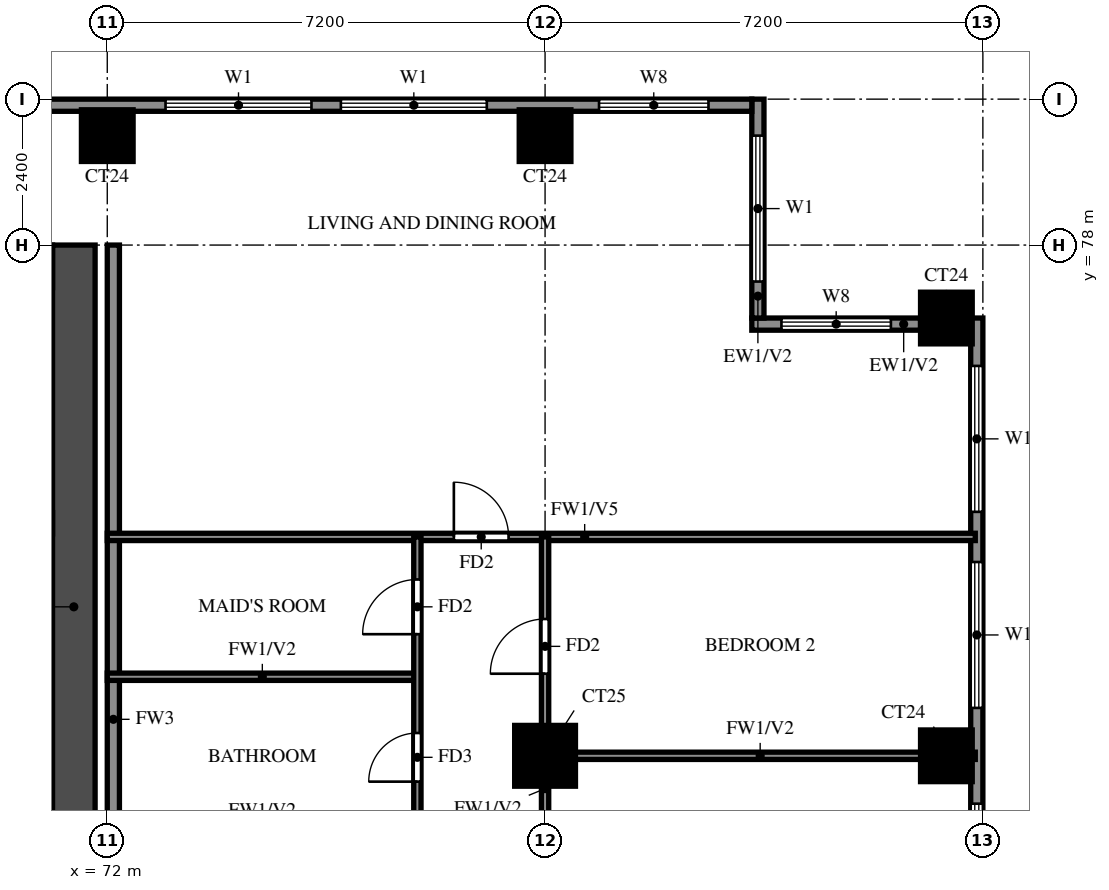
"""IFC4 building model, lengths in metres.
Left out: names, types, materials, properties, quantities, classifications, styles, units other than length and angle.
Written with IfcOpenShell. Run it as: python <this file> out.ifc"""

import sys

from ifc_helpers import new_model, si_unit, direction, frame, frame_2d, origin, origin_2d, place, context, subcontext, project, spatial, rectangle, extrude, source, transform, mapped, element, fill, save


model = new_model("IFC4")
c1 = context("Model", 3, precision=1e-05, world=origin(), true_north=direction((0.0, 1.0)))
c2 = subcontext(c1, "Body", "Model", "MODEL_VIEW")
j1 = project(units=[si_unit("LENGTHUNIT", "METRE"), si_unit("PLANEANGLEUNIT", "RADIAN")], contexts=[c1])
p1 = place(None, origin())
s1 = spatial("IfcSite", under=j1, at=p1, CompositionType="ELEMENT")
p2 = place(p1, origin())
s2 = spatial("IfcBuilding", under=s1, at=p2, CompositionType="ELEMENT")
p3 = place(p2, frame((0.0, 0.0, 146.5)))
s3 = spatial("IfcBuildingStorey", under=s2, at=p3, CompositionType="ELEMENT", Elevation=146.5)
m1 = source(origin(), c2, "Body", "SweptSolid", [
    extrude(rectangle(XDim=1.0, YDim=1.0, at=origin_2d()), origin(), (0.0, 0.0, 1.0), 3.2),
])
p4 = place(p3, frame((79.2, 69.6, 0.0), z_axis=(0.0, 0.0, 1.0), x_axis=(1.0, 0.0, 0.0)))
e1 = element("IfcColumn", 1, at=p4, inside=s3, PredefinedType="COLUMN", context=c2, shape_type="MappedRepresentation", body=[
    mapped(m1, transform((0.0, 0.0, 0.0))),
])
m2 = source(origin(), c2, "Body", "SweptSolid", [
    extrude(rectangle(XDim=0.85, YDim=0.85, at=origin_2d()), origin(), (0.0, 0.0, 1.0), 3.2),
])
for number, where, z_axis, x_axis in (
    (2, (85.8, 69.6, 0.0), (0.0, 0.0, 1.0), (1.0, 0.0, 0.0)),
    (3, (85.8, 76.8, 0.0), (0.0, 0.0, 1.0), (1.0, 0.0, 0.0)),
    (4, (72.0, 79.8, 0.0), (0.0, 0.0, 1.0), (1.0, 0.0, 0.0)),
    (5, (79.2, 79.8, 0.0), (0.0, 0.0, 1.0), (1.0, 0.0, 0.0)),
):
    element("IfcColumn", number, at=place(p3, frame(where, z_axis=z_axis, x_axis=x_axis)), inside=s3, PredefinedType="COLUMN", context=c2, shape_type="MappedRepresentation", body=[
        mapped(m2, transform((0.0, 0.0, 0.0))),
    ])
p5 = place(p3, frame((71.45, 66.1, 0.0), z_axis=(0.0, 0.0, 1.0), x_axis=(0.0, 1.0, 0.0)))
e6 = element("IfcWall", 6, at=p5, inside=s3, PredefinedType="SHEAR", context=c2, shape_type="SweptSolid", body=[
    extrude(rectangle(XDim=11.9, YDim=0.7, at=frame_2d((5.95, 0.0))), origin(), (0.0, 0.0, 1.0), 3.2),
])
p6 = place(p3, frame((29.7, 77.65, 0.0), z_axis=(0.0, 0.0, 1.0), x_axis=(1.0, 0.0, 0.0)))
e7 = element("IfcWall", 7, at=p6, inside=s3, PredefinedType="SHEAR", context=c2, shape_type="SweptSolid", body=[
    extrude(rectangle(XDim=41.4, YDim=0.7, at=frame_2d((20.7, 0.0))), origin(), (0.0, 0.0, 1.0), 3.2),
])
p7 = place(p3, frame((86.3, 62.4, 0.0), z_axis=(0.0, 0.0, 1.0), x_axis=(0.0, 1.0, 0.0)))
e8 = element("IfcWall", 8, at=p7, inside=s3, PredefinedType="SOLIDWALL", context=c2, shape_type="SweptSolid", body=[
    extrude(rectangle(XDim=14.4, YDim=0.2, at=frame_2d((7.2, 0.0))), origin(), (0.0, 0.0, 1.0), 3.2),
])
p8 = place(p7, frame((1.538, 0.0, 1.5)))
e9 = element("IfcOpeningElement", 9, at=p8, cuts=e8, PredefinedType="OPENING", context=c2, shape_type="SweptSolid", body=[
    extrude(rectangle(XDim=0.9, YDim=0.9, at=frame_2d((0.45, 0.45))), frame((0.0, 0.11, 0.0), z_axis=(0.0, -1.0, 0.0), x_axis=(1.0, 0.0, 0.0)), (0.0, 0.0, 1.0), 0.22),
])
p9 = place(p7, frame((4.012, 0.0, 0.6)))
e10 = element("IfcOpeningElement", 10, at=p9, cuts=e8, PredefinedType="OPENING", context=c2, shape_type="SweptSolid", body=[
    extrude(rectangle(XDim=2.4, YDim=2.4, at=frame_2d((1.2, 1.2))), frame((0.0, 0.11, 0.0), z_axis=(0.0, -1.0, 0.0), x_axis=(1.0, 0.0, 0.0)), (0.0, 0.0, 1.0), 0.22),
])
p10 = place(p7, frame((7.988, 0.0, 0.6)))
e11 = element("IfcOpeningElement", 11, at=p10, cuts=e8, PredefinedType="OPENING", context=c2, shape_type="SweptSolid", body=[
    extrude(rectangle(XDim=2.4, YDim=2.4, at=frame_2d((1.2, 1.2))), frame((0.0, 0.11, 0.0), z_axis=(0.0, -1.0, 0.0), x_axis=(1.0, 0.0, 0.0)), (0.0, 0.0, 1.0), 0.22),
])
p11 = place(p7, frame((11.212, 0.0, 0.6)))
e12 = element("IfcOpeningElement", 12, at=p11, cuts=e8, PredefinedType="OPENING", context=c2, shape_type="SweptSolid", body=[
    extrude(rectangle(XDim=2.4, YDim=2.4, at=frame_2d((1.2, 1.2))), frame((0.0, 0.11, 0.0), z_axis=(0.0, -1.0, 0.0), x_axis=(1.0, 0.0, 0.0)), (0.0, 0.0, 1.0), 0.22),
])
p12 = place(p3, frame((85.375, 76.7, 0.0), z_axis=(0.0, 0.0, 1.0), x_axis=(-1.0, 0.0, 0.0)))
e13 = element("IfcWall", 13, at=p12, inside=s3, PredefinedType="SOLIDWALL", context=c2, shape_type="SweptSolid", body=[
    extrude(rectangle(XDim=2.775, YDim=0.2, at=frame_2d((1.387, 0.0))), origin(), (0.0, 0.0, 1.0), 3.2),
])
p13 = place(p12, frame((0.488, 0.0, 0.6)))
e14 = element("IfcOpeningElement", 14, at=p13, cuts=e13, PredefinedType="OPENING", context=c2, shape_type="SweptSolid", body=[
    extrude(rectangle(XDim=1.8, YDim=2.4, at=frame_2d((0.9, 1.2))), frame((0.0, 0.11, 0.0), z_axis=(0.0, -1.0, 0.0), x_axis=(1.0, 0.0, 0.0)), (0.0, 0.0, 1.0), 0.22),
])
p14 = place(p3, frame((82.7, 76.8, 0.0), z_axis=(0.0, 0.0, 1.0), x_axis=(0.0, 1.0, 0.0)))
e15 = element("IfcWall", 15, at=p14, inside=s3, PredefinedType="SOLIDWALL", context=c2, shape_type="SweptSolid", body=[
    extrude(rectangle(XDim=3.6, YDim=0.2, at=frame_2d((1.8, 0.0))), origin(), (0.0, 0.0, 1.0), 3.2),
])
p15 = place(p14, frame((0.6, 0.0, 0.6)))
e16 = element("IfcOpeningElement", 16, at=p15, cuts=e15, PredefinedType="OPENING", context=c2, shape_type="SweptSolid", body=[
    extrude(rectangle(XDim=2.4, YDim=2.4, at=frame_2d((1.2, 1.2))), frame((0.0, 0.11, 0.0), z_axis=(0.0, -1.0, 0.0), x_axis=(1.0, 0.0, 0.0)), (0.0, 0.0, 1.0), 0.22),
])
p16 = place(p3, frame((82.6, 80.3, 0.0), z_axis=(0.0, 0.0, 1.0), x_axis=(-1.0, 0.0, 0.0)))
e17 = element("IfcWall", 17, at=p16, inside=s3, PredefinedType="SOLIDWALL", context=c2, shape_type="SweptSolid", body=[
    extrude(rectangle(XDim=64.6, YDim=0.2, at=frame_2d((32.3, 0.0))), origin(), (0.0, 0.0, 1.0), 3.2),
])
p17 = place(p16, frame((54.7, 0.0, 0.0)))
e18 = element("IfcOpeningElement", 18, at=p17, cuts=e17, PredefinedType="OPENING", context=c2, shape_type="SweptSolid", body=[
    extrude(rectangle(XDim=1.8, YDim=2.4, at=frame_2d((0.9, 1.2))), frame((0.0, 0.11, 0.0), z_axis=(0.0, -1.0, 0.0), x_axis=(1.0, 0.0, 0.0)), (0.0, 0.0, 1.0), 0.22),
])
p18 = place(p16, frame((56.95, 0.0, 0.6)))
e19 = element("IfcOpeningElement", 19, at=p18, cuts=e17, PredefinedType="OPENING", context=c2, shape_type="SweptSolid", body=[
    extrude(rectangle(XDim=0.9, YDim=2.4, at=frame_2d((0.45, 1.2))), frame((0.0, 0.11, 0.0), z_axis=(0.0, -1.0, 0.0), x_axis=(1.0, 0.0, 0.0)), (0.0, 0.0, 1.0), 0.22),
])
p19 = place(p16, frame((58.712, 0.0, 0.6)))
e20 = element("IfcOpeningElement", 20, at=p19, cuts=e17, PredefinedType="OPENING", context=c2, shape_type="SweptSolid", body=[
    extrude(rectangle(XDim=1.8, YDim=2.4, at=frame_2d((0.9, 1.2))), frame((0.0, 0.11, 0.0), z_axis=(0.0, -1.0, 0.0), x_axis=(1.0, 0.0, 0.0)), (0.0, 0.0, 1.0), 0.22),
])
p20 = place(p16, frame((61.988, 0.0, 0.6)))
e21 = element("IfcOpeningElement", 21, at=p20, cuts=e17, PredefinedType="OPENING", context=c2, shape_type="SweptSolid", body=[
    extrude(rectangle(XDim=1.8, YDim=2.4, at=frame_2d((0.9, 1.2))), frame((0.0, 0.11, 0.0), z_axis=(0.0, -1.0, 0.0), x_axis=(1.0, 0.0, 0.0)), (0.0, 0.0, 1.0), 0.22),
])
p21 = place(p16, frame((0.712, 0.0, 0.6)))
e22 = element("IfcOpeningElement", 22, at=p21, cuts=e17, PredefinedType="OPENING", context=c2, shape_type="SweptSolid", body=[
    extrude(rectangle(XDim=1.8, YDim=2.4, at=frame_2d((0.9, 1.2))), frame((0.0, 0.11, 0.0), z_axis=(0.0, -1.0, 0.0), x_axis=(1.0, 0.0, 0.0)), (0.0, 0.0, 1.0), 0.22),
])
p22 = place(p16, frame((4.358, 0.0, 0.6)))
e23 = element("IfcOpeningElement", 23, at=p22, cuts=e17, PredefinedType="OPENING", context=c2, shape_type="SweptSolid", body=[
    extrude(rectangle(XDim=2.4, YDim=2.4, at=frame_2d((1.2, 1.2))), frame((0.0, 0.11, 0.0), z_axis=(0.0, -1.0, 0.0), x_axis=(1.0, 0.0, 0.0)), (0.0, 0.0, 1.0), 0.22),
])
p23 = place(p16, frame((7.242, 0.0, 0.6)))
e24 = element("IfcOpeningElement", 24, at=p23, cuts=e17, PredefinedType="OPENING", context=c2, shape_type="SweptSolid", body=[
    extrude(rectangle(XDim=2.4, YDim=2.4, at=frame_2d((1.2, 1.2))), frame((0.0, 0.11, 0.0), z_axis=(0.0, -1.0, 0.0), x_axis=(1.0, 0.0, 0.0)), (0.0, 0.0, 1.0), 0.22),
])
p24 = place(p3, frame((72.1, 62.4, 0.0), z_axis=(0.0, 0.0, 1.0), x_axis=(0.0, 1.0, 0.0)))
e25 = element("IfcWall", 25, at=p24, inside=s3, PredefinedType="SOLIDWALL", context=c2, shape_type="SweptSolid", body=[
    extrude(rectangle(XDim=15.6, YDim=0.2, at=frame_2d((7.8, 0.0))), origin(), (0.0, 0.0, 1.0), 3.2),
])
p25 = place(p3, frame((79.2, 69.6, 0.0), z_axis=(0.0, 0.0, 1.0), x_axis=(1.0, 0.0, 0.0)))
e26 = element("IfcWall", 26, at=p25, inside=s3, PredefinedType="PARTITIONING", context=c2, shape_type="SweptSolid", body=[
    extrude(rectangle(XDim=7.075, YDim=0.12, at=frame_2d((3.538, 0.0))), origin(), (0.0, 0.0, 1.0), 3.2),
])
p26 = place(p3, frame((72.0, 70.9, 0.0), z_axis=(0.0, 0.0, 1.0), x_axis=(1.0, 0.0, 0.0)))
e27 = element("IfcWall", 27, at=p26, inside=s3, PredefinedType="PARTITIONING", context=c2, shape_type="SweptSolid", body=[
    extrude(rectangle(XDim=5.1, YDim=0.12, at=frame_2d((2.55, 0.0))), origin(), (0.0, 0.0, 1.0), 3.2),
])
p27 = place(p3, frame((72.0, 73.2, 0.0), z_axis=(0.0, 0.0, 1.0), x_axis=(1.0, 0.0, 0.0)))
e28 = element("IfcWall", 28, at=p27, inside=s3, PredefinedType="PARTITIONING", context=c2, shape_type="SweptSolid", body=[
    extrude(rectangle(XDim=14.275, YDim=0.12, at=frame_2d((7.137, 0.0))), origin(), (0.0, 0.0, 1.0), 2.3),
])
p28 = place(p27, frame((5.7, 0.0, 0.0)))
e29 = element("IfcOpeningElement", 29, at=p28, cuts=e28, PredefinedType="OPENING", context=c2, shape_type="SweptSolid", body=[
    extrude(rectangle(XDim=0.9, YDim=2.1, at=frame_2d((0.45, 1.05))), frame((0.0, 0.07, 0.0), z_axis=(0.0, -1.0, 0.0), x_axis=(1.0, 0.0, 0.0)), (0.0, 0.0, 1.0), 0.14),
])
p29 = place(p3, frame((77.1, 61.2, 0.0), z_axis=(0.0, 0.0, 1.0), x_axis=(0.0, 1.0, 0.0)))
e30 = element("IfcWall", 30, at=p29, inside=s3, PredefinedType="PARTITIONING", context=c2, shape_type="SweptSolid", body=[
    extrude(rectangle(XDim=12.0, YDim=0.12, at=frame_2d((6.0, 0.0))), origin(), (0.0, 0.0, 1.0), 3.2),
])
p30 = place(p29, frame((5.45, 0.0, 0.0)))
e31 = element("IfcOpeningElement", 31, at=p30, cuts=e30, PredefinedType="OPENING", context=c2, shape_type="SweptSolid", body=[
    extrude(rectangle(XDim=0.8, YDim=2.1, at=frame_2d((0.4, 1.05))), frame((0.0, 0.07, 0.0), z_axis=(0.0, -1.0, 0.0), x_axis=(1.0, 0.0, 0.0)), (0.0, 0.0, 1.0), 0.14),
])
p31 = place(p29, frame((7.975, 0.0, 0.0)))
e32 = element("IfcOpeningElement", 32, at=p31, cuts=e30, PredefinedType="OPENING", context=c2, shape_type="SweptSolid", body=[
    extrude(rectangle(XDim=0.8, YDim=2.1, at=frame_2d((0.4, 1.05))), frame((0.0, 0.07, 0.0), z_axis=(0.0, -1.0, 0.0), x_axis=(1.0, 0.0, 0.0)), (0.0, 0.0, 1.0), 0.14),
])
p32 = place(p29, frame((10.4, 0.0, 0.0)))
e33 = element("IfcOpeningElement", 33, at=p32, cuts=e30, PredefinedType="OPENING", context=c2, shape_type="SweptSolid", body=[
    extrude(rectangle(XDim=0.9, YDim=2.1, at=frame_2d((0.45, 1.05))), frame((0.0, 0.07, 0.0), z_axis=(0.0, -1.0, 0.0), x_axis=(1.0, 0.0, 0.0)), (0.0, 0.0, 1.0), 0.14),
])
p33 = place(p3, frame((79.2, 66.0, 0.0), z_axis=(0.0, 0.0, 1.0), x_axis=(0.0, 1.0, 0.0)))
e34 = element("IfcWall", 34, at=p33, inside=s3, PredefinedType="PARTITIONING", context=c2, shape_type="SweptSolid", body=[
    extrude(rectangle(XDim=7.2, YDim=0.12, at=frame_2d((3.6, 0.0))), origin(), (0.0, 0.0, 1.0), 3.2),
])
p34 = place(p33, frame((1.35, 0.0, 0.0)))
e35 = element("IfcOpeningElement", 35, at=p34, cuts=e34, PredefinedType="OPENING", context=c2, shape_type="SweptSolid", body=[
    extrude(rectangle(XDim=0.9, YDim=2.1, at=frame_2d((0.45, 1.05))), frame((0.0, 0.07, 0.0), z_axis=(0.0, -1.0, 0.0), x_axis=(1.0, 0.0, 0.0)), (0.0, 0.0, 1.0), 0.14),
])
p35 = place(p33, frame((4.95, 0.0, 0.0)))
e36 = element("IfcOpeningElement", 36, at=p35, cuts=e34, PredefinedType="OPENING", context=c2, shape_type="SweptSolid", body=[
    extrude(rectangle(XDim=0.9, YDim=2.1, at=frame_2d((0.45, 1.05))), frame((0.0, 0.07, 0.0), z_axis=(0.0, -1.0, 0.0), x_axis=(1.0, 0.0, 0.0)), (0.0, 0.0, 1.0), 0.14),
])
p36 = place(p9, origin())
e37 = element("IfcWindow", 37, at=p36, inside=s3, PartitioningType="DOUBLE_PANEL_VERTICAL", PredefinedType="WINDOW", context=c2, shape_type="SweptSolid", body=[
    extrude(rectangle(XDim=2.4, YDim=2.4, at=frame_2d((1.2, 1.2))), frame((0.0, 0.03, 0.0), z_axis=(0.0, -1.0, 0.0), x_axis=(1.0, 0.0, 0.0)), (0.0, 0.0, 1.0), 0.06),
])
fill(e10, e37)
p37 = place(p10, origin())
e38 = element("IfcWindow", 38, at=p37, inside=s3, PartitioningType="DOUBLE_PANEL_VERTICAL", PredefinedType="WINDOW", context=c2, shape_type="SweptSolid", body=[
    extrude(rectangle(XDim=2.4, YDim=2.4, at=frame_2d((1.2, 1.2))), frame((0.0, 0.03, 0.0), z_axis=(0.0, -1.0, 0.0), x_axis=(1.0, 0.0, 0.0)), (0.0, 0.0, 1.0), 0.06),
])
fill(e11, e38)
p38 = place(p11, origin())
e39 = element("IfcWindow", 39, at=p38, inside=s3, PartitioningType="DOUBLE_PANEL_VERTICAL", PredefinedType="WINDOW", context=c2, shape_type="SweptSolid", body=[
    extrude(rectangle(XDim=2.4, YDim=2.4, at=frame_2d((1.2, 1.2))), frame((0.0, 0.03, 0.0), z_axis=(0.0, -1.0, 0.0), x_axis=(1.0, 0.0, 0.0)), (0.0, 0.0, 1.0), 0.06),
])
fill(e12, e39)
p39 = place(p13, origin())
e40 = element("IfcWindow", 40, at=p39, inside=s3, PartitioningType="DOUBLE_PANEL_VERTICAL", PredefinedType="WINDOW", context=c2, shape_type="SweptSolid", body=[
    extrude(rectangle(XDim=1.8, YDim=2.4, at=frame_2d((0.9, 1.2))), frame((0.0, 0.03, 0.0), z_axis=(0.0, -1.0, 0.0), x_axis=(1.0, 0.0, 0.0)), (0.0, 0.0, 1.0), 0.06),
])
fill(e14, e40)
p40 = place(p15, origin())
e41 = element("IfcWindow", 41, at=p40, inside=s3, PartitioningType="DOUBLE_PANEL_VERTICAL", PredefinedType="WINDOW", context=c2, shape_type="SweptSolid", body=[
    extrude(rectangle(XDim=2.4, YDim=2.4, at=frame_2d((1.2, 1.2))), frame((0.0, 0.03, 0.0), z_axis=(0.0, -1.0, 0.0), x_axis=(1.0, 0.0, 0.0)), (0.0, 0.0, 1.0), 0.06),
])
fill(e16, e41)
p41 = place(p21, origin())
e42 = element("IfcWindow", 42, at=p41, inside=s3, PartitioningType="DOUBLE_PANEL_VERTICAL", PredefinedType="WINDOW", context=c2, shape_type="SweptSolid", body=[
    extrude(rectangle(XDim=1.8, YDim=2.4, at=frame_2d((0.9, 1.2))), frame((0.0, 0.03, 0.0), z_axis=(0.0, -1.0, 0.0), x_axis=(1.0, 0.0, 0.0)), (0.0, 0.0, 1.0), 0.06),
])
fill(e22, e42)
p42 = place(p22, origin())
e43 = element("IfcWindow", 43, at=p42, inside=s3, PartitioningType="DOUBLE_PANEL_VERTICAL", PredefinedType="WINDOW", context=c2, shape_type="SweptSolid", body=[
    extrude(rectangle(XDim=2.4, YDim=2.4, at=frame_2d((1.2, 1.2))), frame((0.0, 0.03, 0.0), z_axis=(0.0, -1.0, 0.0), x_axis=(1.0, 0.0, 0.0)), (0.0, 0.0, 1.0), 0.06),
])
fill(e23, e43)
p43 = place(p23, origin())
e44 = element("IfcWindow", 44, at=p43, inside=s3, PartitioningType="DOUBLE_PANEL_VERTICAL", PredefinedType="WINDOW", context=c2, shape_type="SweptSolid", body=[
    extrude(rectangle(XDim=2.4, YDim=2.4, at=frame_2d((1.2, 1.2))), frame((0.0, 0.03, 0.0), z_axis=(0.0, -1.0, 0.0), x_axis=(1.0, 0.0, 0.0)), (0.0, 0.0, 1.0), 0.06),
])
fill(e24, e44)
p44 = place(p35, origin())
e45 = element("IfcDoor", 45, at=p44, inside=s3, OperationType="SINGLE_SWING_RIGHT", PredefinedType="DOOR", context=c2, shape_type="SweptSolid", body=[
    extrude(rectangle(XDim=0.9, YDim=2.1, at=frame_2d((0.45, 1.05))), frame((0.0, 0.025, 0.0), z_axis=(0.0, -1.0, 0.0), x_axis=(1.0, 0.0, 0.0)), (0.0, 0.0, 1.0), 0.05),
])
fill(e36, e45)
p45 = place(p28, origin())
e46 = element("IfcDoor", 46, at=p45, inside=s3, OperationType="SINGLE_SWING_LEFT", PredefinedType="DOOR", context=c2, shape_type="SweptSolid", body=[
    extrude(rectangle(XDim=0.9, YDim=2.1, at=frame_2d((0.45, 1.05))), frame((0.0, 0.025, 0.0), z_axis=(0.0, -1.0, 0.0), x_axis=(1.0, 0.0, 0.0)), (0.0, 0.0, 1.0), 0.05),
])
fill(e29, e46)
p46 = place(p31, origin())
e47 = element("IfcDoor", 47, at=p46, inside=s3, OperationType="SINGLE_SWING_LEFT", PredefinedType="DOOR", context=c2, shape_type="SweptSolid", body=[
    extrude(rectangle(XDim=0.8, YDim=2.1, at=frame_2d((0.4, 1.05))), frame((0.0, 0.025, 0.0), z_axis=(0.0, -1.0, 0.0), x_axis=(1.0, 0.0, 0.0)), (0.0, 0.0, 1.0), 0.05),
])
fill(e32, e47)
p47 = place(p32, origin())
e48 = element("IfcDoor", 48, at=p47, inside=s3, OperationType="SINGLE_SWING_LEFT", PredefinedType="DOOR", context=c2, shape_type="SweptSolid", body=[
    extrude(rectangle(XDim=0.9, YDim=2.1, at=frame_2d((0.45, 1.05))), frame((0.0, 0.025, 0.0), z_axis=(0.0, -1.0, 0.0), x_axis=(1.0, 0.0, 0.0)), (0.0, 0.0, 1.0), 0.05),
])
fill(e33, e48)
save(model, sys.argv[1])
